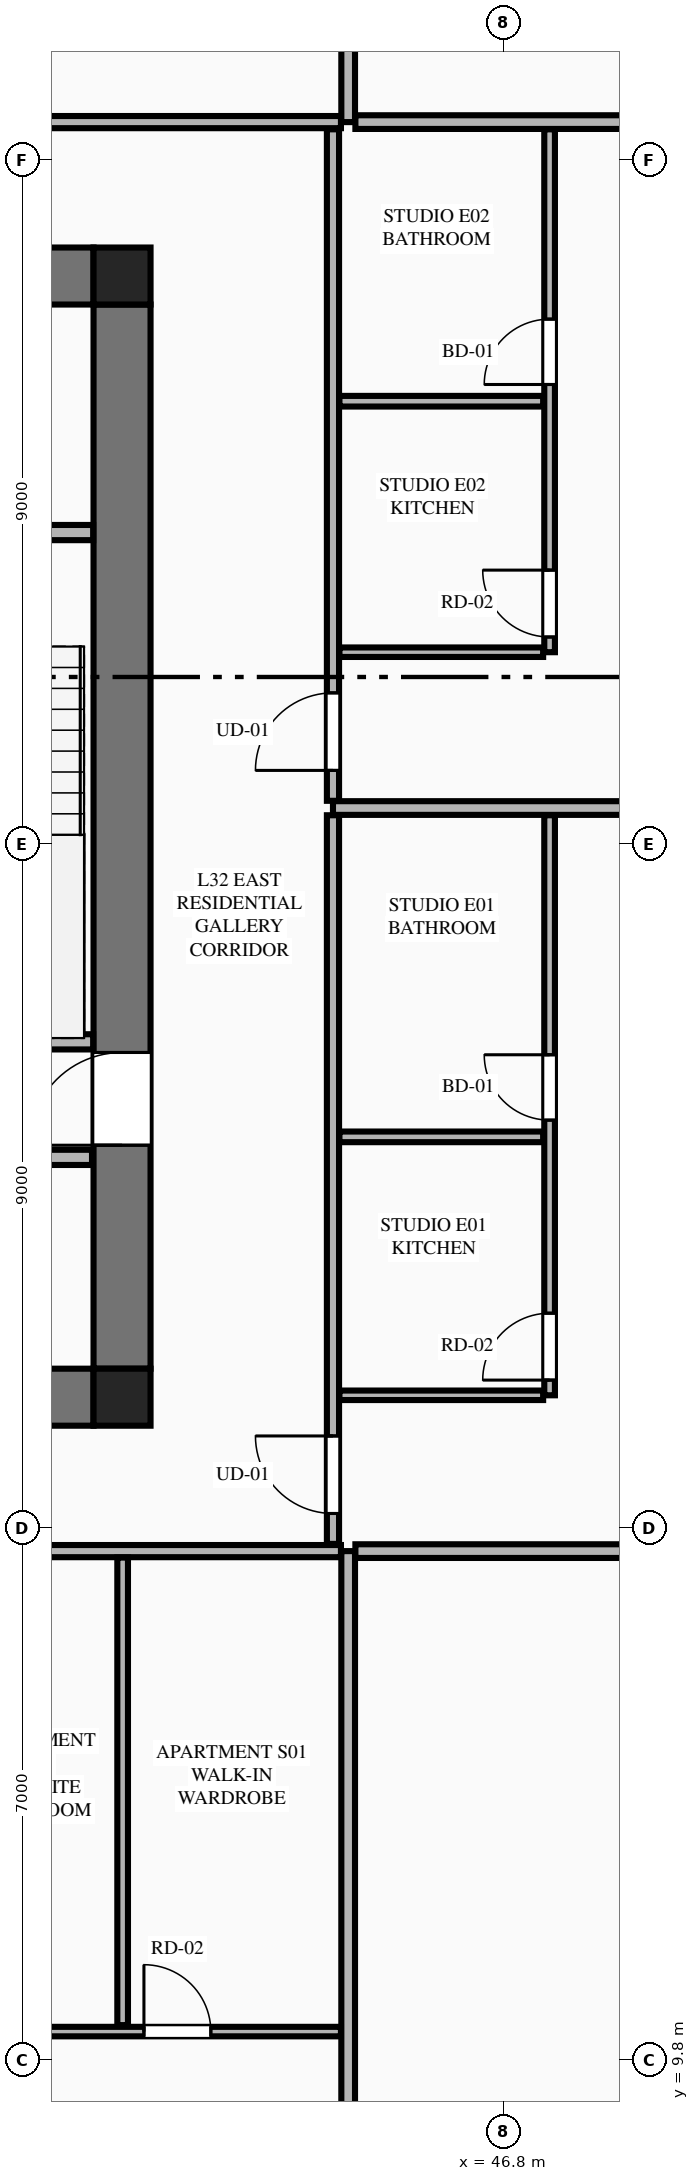
"""IFC4 building model, lengths in metres.
Left out: names, types, materials, properties, quantities, classifications, styles, units other than length and angle.
Written with IfcOpenShell. Run it as: python <this file> out.ifc"""

import sys

from ifc_helpers import new_model, si_unit, direction, frame, frame_2d, origin, origin_2d, place, context, subcontext, project, spatial, rectangle, extrude, element, fill, save


model = new_model("IFC4")
c1 = context("Model", 3, precision=1e-05, world=origin(), true_north=direction((0.0, 1.0)))
c2 = subcontext(c1, "Body", "Model", "MODEL_VIEW")
j1 = project(units=[si_unit("LENGTHUNIT", "METRE"), si_unit("PLANEANGLEUNIT", "RADIAN")], contexts=[c1])
p1 = place(None, origin())
s1 = spatial("IfcSite", under=j1, at=p1, CompositionType="ELEMENT")
p2 = place(p1, origin())
s2 = spatial("IfcBuilding", under=s1, at=p2, CompositionType="ELEMENT")
p3 = place(p2, frame((0.0, 0.0, 123.25)))
s3 = spatial("IfcBuildingStorey", under=s2, at=p3, CompositionType="ELEMENT", Elevation=123.25)
for number, where, z_axis, x_axis in (
    (1, (41.775, 18.525, 0.0), (0.0, 0.0, 1.0), (1.0, 0.0, 0.0)),
    (2, (41.775, 33.275, 0.0), (0.0, 0.0, 1.0), (1.0, 0.0, 0.0)),
):
    element("IfcColumn", number, at=place(p3, frame(where, z_axis=z_axis, x_axis=x_axis)), inside=s3, PredefinedType="COLUMN", context=c2, shape_type="SweptSolid", body=[
        extrude(rectangle(XDim=0.75, YDim=0.75, at=origin_2d()), origin(), (0.0, 0.0, 1.0), 3.55),
    ])
for number, where, z_axis, x_axis in (
    (3, (23.4, 18.525, 0.0), (0.0, 0.0, 1.0), (1.0, 0.0, 0.0)),
    (4, (23.4, 33.275, 0.0), (0.0, 0.0, 1.0), (1.0, 0.0, 0.0)),
):
    element("IfcWall", number, at=place(p3, frame(where, z_axis=z_axis, x_axis=x_axis)), inside=s3, PredefinedType="SHEAR", context=c2, shape_type="SweptSolid", body=[
        extrude(rectangle(XDim=18.0, YDim=0.75, at=frame_2d((9.0, 0.0))), origin(), (0.0, 0.0, 1.0), 3.34),
    ])
p4 = place(p3, frame((41.775, 18.9, 0.0), z_axis=(0.0, 0.0, 1.0), x_axis=(0.0, 1.0, 0.0)))
e5 = element("IfcWall", 5, at=p4, inside=s3, PredefinedType="SHEAR", context=c2, shape_type="SweptSolid", body=[
    extrude(rectangle(XDim=14.0, YDim=0.75, at=frame_2d((7.0, 0.0))), origin(), (0.0, 0.0, 1.0), 3.34),
])
p5 = place(p4, frame((2.94, 0.0, 0.0)))
e6 = element("IfcOpeningElement", 6, at=p5, cuts=e5, PredefinedType="OPENING", context=c2, shape_type="SweptSolid", body=[
    extrude(rectangle(XDim=1.22, YDim=2.25, at=frame_2d((0.61, 1.125))), frame((0.0, 0.385, 0.0), z_axis=(0.0, -1.0, 0.0), x_axis=(1.0, 0.0, 0.0)), (0.0, 0.0, 1.0), 0.77),
])
p6 = place(p3, frame((38.125, 23.2, 0.0), z_axis=(0.0, 0.0, 1.0), x_axis=(1.0, 0.0, 0.0)))
e7 = element("IfcWall", 7, at=p6, inside=s3, PredefinedType="PLUMBINGWALL", context=c2, shape_type="SweptSolid", body=[
    extrude(rectangle(XDim=3.27, YDim=0.2, at=frame_2d((1.635, 0.0))), origin(), (0.0, 0.0, 1.0), 3.34),
])
p7 = place(p3, frame((38.125, 29.9, 0.0), z_axis=(0.0, 0.0, 1.0), x_axis=(1.0, 0.0, 0.0)))
e8 = element("IfcWall", 8, at=p7, inside=s3, PredefinedType="PLUMBINGWALL", context=c2, shape_type="SweptSolid", body=[
    extrude(rectangle(XDim=3.27, YDim=0.2, at=frame_2d((1.635, 0.0))), origin(), (0.0, 0.0, 1.0), 3.34),
])
p8 = place(p7, frame((0.5, 0.0, 0.0)))
e9 = element("IfcOpeningElement", 9, at=p8, cuts=e8, PredefinedType="OPENING", context=c2, shape_type="SweptSolid", body=[
    extrude(rectangle(XDim=0.85, YDim=2.05, at=frame_2d((0.425, 1.025))), frame((0.0, 0.11, 0.0), z_axis=(0.0, -1.0, 0.0), x_axis=(1.0, 0.0, 0.0)), (0.0, 0.0, 1.0), 0.22),
])
p9 = place(p3, frame((23.42, 21.68, 0.0), z_axis=(0.0, 0.0, 1.0), x_axis=(1.0, 0.0, 0.0)))
e10 = element("IfcWall", 10, at=p9, inside=s3, PredefinedType="PLUMBINGWALL", context=c2, shape_type="SweptSolid", body=[
    extrude(rectangle(XDim=17.96, YDim=0.2, at=frame_2d((8.98, 0.0))), origin(), (0.0, 0.0, 1.0), 3.34),
])
p10 = place(p9, frame((11.6, 0.0, 0.0)))
e11 = element("IfcOpeningElement", 11, at=p10, cuts=e10, PredefinedType="OPENING", context=c2, shape_type="SweptSolid", body=[
    extrude(rectangle(XDim=1.1, YDim=2.2, at=frame_2d((0.55, 1.1))), frame((0.0, 0.11, 0.0), z_axis=(0.0, -1.0, 0.0), x_axis=(1.0, 0.0, 0.0)), (0.0, 0.0, 1.0), 0.22),
])
p11 = place(p9, frame((0.41, 0.0, 0.0)))
e12 = element("IfcOpeningElement", 12, at=p11, cuts=e10, PredefinedType="OPENING", context=c2, shape_type="SweptSolid", body=[
    extrude(rectangle(XDim=0.85, YDim=2.05, at=frame_2d((0.425, 1.025))), frame((0.0, 0.11, 0.0), z_axis=(0.0, -1.0, 0.0), x_axis=(1.0, 0.0, 0.0)), (0.0, 0.0, 1.0), 0.22),
])
p12 = place(p9, frame((13.78, 0.0, 0.0)))
e13 = element("IfcOpeningElement", 13, at=p12, cuts=e10, PredefinedType="OPENING", context=c2, shape_type="SweptSolid", body=[
    extrude(rectangle(XDim=0.85, YDim=2.05, at=frame_2d((0.425, 1.025))), frame((0.0, 0.11, 0.0), z_axis=(0.0, -1.0, 0.0), x_axis=(1.0, 0.0, 0.0)), (0.0, 0.0, 1.0), 0.22),
])
p13 = place(p9, frame((16.13, 0.0, 0.0)))
e14 = element("IfcOpeningElement", 14, at=p13, cuts=e10, PredefinedType="OPENING", context=c2, shape_type="SweptSolid", body=[
    extrude(rectangle(XDim=0.85, YDim=2.05, at=frame_2d((0.425, 1.025))), frame((0.0, 0.11, 0.0), z_axis=(0.0, -1.0, 0.0), x_axis=(1.0, 0.0, 0.0)), (0.0, 0.0, 1.0), 0.22),
])
p14 = place(p3, frame((47.975, 6.852, 0.0), z_axis=(0.0, 0.0, 1.0), x_axis=(0.451548465867, 0.892246593142, 0.0)))
e15 = element("IfcWall", 15, at=p14, inside=s3, PredefinedType="STANDARD", context=c2, shape_type="SweptSolid", body=[
    extrude(rectangle(XDim=5.04, YDim=0.34, at=frame_2d((2.52, 0.0))), origin(), (0.0, 0.0, 1.0), 2.797),
])
p15 = place(p14, frame((1.97, 0.0, 0.75)))
e16 = element("IfcOpeningElement", 16, at=p15, cuts=e15, PredefinedType="OPENING", context=c2, shape_type="SweptSolid", body=[
    extrude(rectangle(XDim=1.1, YDim=1.897, at=frame_2d((0.55, 0.948))), frame((0.0, 0.18, 0.0), z_axis=(0.0, -1.0, 0.0), x_axis=(1.0, 0.0, 0.0)), (0.0, 0.0, 1.0), 0.36),
])
p16 = place(p3, frame((44.75, 4.105, 0.0), z_axis=(0.0, 0.0, 1.0), x_axis=(0.0, 1.0, 0.0)))
e17 = element("IfcWall", 17, at=p16, inside=s3, PredefinedType="PARTITIONING", context=c2, shape_type="SweptSolid", body=[
    extrude(rectangle(XDim=12.395, YDim=0.18, at=frame_2d((6.198, 0.0))), origin(), (0.0, 0.0, 1.0), 3.34),
])
p17 = place(p3, frame((20.145, 16.5, 0.0), z_axis=(0.0, 0.0, 1.0), x_axis=(1.0, 0.0, 0.0)))
e18 = element("IfcWall", 18, at=p17, inside=s3, PredefinedType="PARTITIONING", context=c2, shape_type="SweptSolid", body=[
    extrude(rectangle(XDim=24.51, YDim=0.16, at=frame_2d((12.255, 0.0))), origin(), (0.0, 0.0, 1.0), 3.34),
])
p18 = place(p17, frame((0.405, 0.0, 0.0)))
e19 = element("IfcOpeningElement", 19, at=p18, cuts=e18, PredefinedType="OPENING", context=c2, shape_type="SweptSolid", body=[
    extrude(rectangle(XDim=1.35, YDim=2.35, at=frame_2d((0.675, 1.175))), frame((0.0, 0.09, 0.0), z_axis=(0.0, -1.0, 0.0), x_axis=(1.0, 0.0, 0.0)), (0.0, 0.0, 1.0), 0.18),
])
p19 = place(p3, frame((34.643, 10.179, 0.0), z_axis=(0.0, 0.0, 1.0), x_axis=(1.0, 0.0, 0.0)))
e20 = element("IfcWall", 20, at=p19, inside=s3, PredefinedType="PARTITIONING", context=c2, shape_type="SweptSolid", body=[
    extrude(rectangle(XDim=10.012, YDim=0.125, at=frame_2d((5.006, 0.0))), origin(), (0.0, 0.0, 1.0), 3.34),
])
p20 = place(p19, frame((5.18, 0.0, 0.0)))
e21 = element("IfcOpeningElement", 21, at=p20, cuts=e20, PredefinedType="OPENING", context=c2, shape_type="SweptSolid", body=[
    extrude(rectangle(XDim=0.86, YDim=2.1, at=frame_2d((0.43, 1.05))), frame((0.0, 0.073, 0.0), z_axis=(0.0, -1.0, 0.0), x_axis=(1.0, 0.0, 0.0)), (0.0, 0.0, 1.0), 0.145),
])
p21 = place(p19, frame((7.42, 0.0, 0.0)))
e22 = element("IfcOpeningElement", 22, at=p21, cuts=e20, PredefinedType="OPENING", context=c2, shape_type="SweptSolid", body=[
    extrude(rectangle(XDim=0.88, YDim=2.15, at=frame_2d((0.44, 1.075))), frame((0.0, 0.073, 0.0), z_axis=(0.0, -1.0, 0.0), x_axis=(1.0, 0.0, 0.0)), (0.0, 0.0, 1.0), 0.145),
])
p22 = place(p19, frame((0.3, 0.0, 0.0)))
e23 = element("IfcOpeningElement", 23, at=p22, cuts=e20, PredefinedType="OPENING", context=c2, shape_type="SweptSolid", body=[
    extrude(rectangle(XDim=0.88, YDim=2.15, at=frame_2d((0.44, 1.075))), frame((0.0, 0.073, 0.0), z_axis=(0.0, -1.0, 0.0), x_axis=(1.0, 0.0, 0.0)), (0.0, 0.0, 1.0), 0.145),
])
p23 = place(p3, frame((41.783, 10.264, 0.0), z_axis=(0.0, 0.0, 1.0), x_axis=(0.0, 1.0, 0.0)))
e24 = element("IfcWall", 24, at=p23, inside=s3, PredefinedType="PLUMBINGWALL", context=c2, shape_type="SweptSolid", body=[
    extrude(rectangle(XDim=6.151, YDim=0.14, at=frame_2d((3.076, 0.0))), origin(), (0.0, 0.0, 1.0), 2.722),
])
p24 = place(p3, frame((44.75, 35.3, 0.0), z_axis=(0.0, 0.0, 1.0), x_axis=(0.0, 1.0, 0.0)))
e25 = element("IfcWall", 25, at=p24, inside=s3, PredefinedType="PARTITIONING", context=c2, shape_type="SweptSolid", body=[
    extrude(rectangle(XDim=12.195, YDim=0.18, at=frame_2d((6.098, 0.0))), origin(), (0.0, 0.0, 1.0), 3.34),
])
p25 = place(p3, frame((20.145, 35.3, 0.0), z_axis=(0.0, 0.0, 1.0), x_axis=(1.0, 0.0, 0.0)))
e26 = element("IfcWall", 26, at=p25, inside=s3, PredefinedType="PARTITIONING", context=c2, shape_type="SweptSolid", body=[
    extrude(rectangle(XDim=24.51, YDim=0.16, at=frame_2d((12.255, 0.0))), origin(), (0.0, 0.0, 1.0), 3.34),
])
p26 = place(p25, frame((0.405, 0.0, 0.0)))
e27 = element("IfcOpeningElement", 27, at=p26, cuts=e26, PredefinedType="OPENING", context=c2, shape_type="SweptSolid", body=[
    extrude(rectangle(XDim=1.02, YDim=2.25, at=frame_2d((0.51, 1.125))), frame((0.0, 0.09, 0.0), z_axis=(0.0, -1.0, 0.0), x_axis=(1.0, 0.0, 0.0)), (0.0, 0.0, 1.0), 0.18),
])
p27 = place(p3, frame((44.845, 16.5, 0.0), z_axis=(0.0, 0.0, 1.0), x_axis=(1.0, 0.0, 0.0)))
e28 = element("IfcWall", 28, at=p27, inside=s3, PredefinedType="PARTITIONING", context=c2, shape_type="SweptSolid", body=[
    extrude(rectangle(XDim=7.77, YDim=0.18, at=frame_2d((3.885, 0.0))), origin(), (0.0, 0.0, 1.0), 3.34),
])
p28 = place(p3, frame((44.845, 35.3, 0.0), z_axis=(0.0, 0.0, 1.0), x_axis=(1.0, 0.0, 0.0)))
e29 = element("IfcWall", 29, at=p28, inside=s3, PredefinedType="PARTITIONING", context=c2, shape_type="SweptSolid", body=[
    extrude(rectangle(XDim=7.669, YDim=0.18, at=frame_2d((3.834, 0.0))), origin(), (0.0, 0.0, 1.0), 3.34),
])
p29 = place(p3, frame((44.55, 16.595, 0.0), z_axis=(0.0, 0.0, 1.0), x_axis=(0.0, 1.0, 0.0)))
e30 = element("IfcWall", 30, at=p29, inside=s3, PredefinedType="PARTITIONING", context=c2, shape_type="SweptSolid", body=[
    extrude(rectangle(XDim=9.586, YDim=0.16, at=frame_2d((4.793, 0.0))), origin(), (0.0, 0.0, 1.0), 3.34),
])
p30 = place(p29, frame((0.4, 0.0, 0.0)))
e31 = element("IfcOpeningElement", 31, at=p30, cuts=e30, PredefinedType="OPENING", context=c2, shape_type="SweptSolid", body=[
    extrude(rectangle(XDim=1.02, YDim=2.25, at=frame_2d((0.51, 1.125))), frame((0.0, 0.09, 0.0), z_axis=(0.0, -1.0, 0.0), x_axis=(1.0, 0.0, 0.0)), (0.0, 0.0, 1.0), 0.18),
])
p31 = place(p3, frame((44.635, 18.55, 0.0), z_axis=(0.0, 0.0, 1.0), x_axis=(1.0, 0.0, 0.0)))
e32 = element("IfcWall", 32, at=p31, inside=s3, PredefinedType="PARTITIONING", context=c2, shape_type="SweptSolid", body=[
    extrude(rectangle(XDim=2.68, YDim=0.125, at=frame_2d((1.34, 0.0))), origin(), (0.0, 0.0, 1.0), 2.722),
])
p32 = place(p3, frame((47.4, 18.55, 0.0), z_axis=(0.0, 0.0, 1.0), x_axis=(0.0, 1.0, 0.0)))
e33 = element("IfcWall", 33, at=p32, inside=s3, PredefinedType="PLUMBINGWALL", context=c2, shape_type="SweptSolid", body=[
    extrude(rectangle(XDim=7.631, YDim=0.14, at=frame_2d((3.815, 0.0))), origin(), (0.0, 0.0, 1.0), 3.34),
])
p33 = place(p32, frame((3.62, 0.0, 0.0)))
e34 = element("IfcOpeningElement", 34, at=p33, cuts=e33, PredefinedType="OPENING", context=c2, shape_type="SweptSolid", body=[
    extrude(rectangle(XDim=0.86, YDim=2.1, at=frame_2d((0.43, 1.05))), frame((0.0, 0.08, 0.0), z_axis=(0.0, -1.0, 0.0), x_axis=(1.0, 0.0, 0.0)), (0.0, 0.0, 1.0), 0.16),
])
p34 = place(p32, frame((0.2, 0.0, 0.0)))
e35 = element("IfcOpeningElement", 35, at=p34, cuts=e33, PredefinedType="OPENING", context=c2, shape_type="SweptSolid", body=[
    extrude(rectangle(XDim=0.88, YDim=2.15, at=frame_2d((0.44, 1.075))), frame((0.0, 0.08, 0.0), z_axis=(0.0, -1.0, 0.0), x_axis=(1.0, 0.0, 0.0)), (0.0, 0.0, 1.0), 0.16),
])
p35 = place(p3, frame((44.635, 21.95, 0.0), z_axis=(0.0, 0.0, 1.0), x_axis=(1.0, 0.0, 0.0)))
e36 = element("IfcWall", 36, at=p35, inside=s3, PredefinedType="PLUMBINGWALL", context=c2, shape_type="SweptSolid", body=[
    extrude(rectangle(XDim=2.68, YDim=0.14, at=frame_2d((1.34, 0.0))), origin(), (0.0, 0.0, 1.0), 3.34),
])
p36 = place(p3, frame((44.55, 26.276, 0.0), z_axis=(0.0, 0.0, 1.0), x_axis=(1.0, 0.0, 0.0)))
e37 = element("IfcWall", 37, at=p36, inside=s3, PredefinedType="PARTITIONING", context=c2, shape_type="SweptSolid", body=[
    extrude(rectangle(XDim=12.308, YDim=0.18, at=frame_2d((6.154, 0.0))), origin(), (0.0, 0.0, 1.0), 3.34),
])
p37 = place(p3, frame((44.55, 26.371, 0.0), z_axis=(0.0, 0.0, 1.0), x_axis=(0.0, 1.0, 0.0)))
e38 = element("IfcWall", 38, at=p37, inside=s3, PredefinedType="PARTITIONING", context=c2, shape_type="SweptSolid", body=[
    extrude(rectangle(XDim=8.834, YDim=0.16, at=frame_2d((4.417, 0.0))), origin(), (0.0, 0.0, 1.0), 3.34),
])
p38 = place(p37, frame((0.4, 0.0, 0.0)))
e39 = element("IfcOpeningElement", 39, at=p38, cuts=e38, PredefinedType="OPENING", context=c2, shape_type="SweptSolid", body=[
    extrude(rectangle(XDim=1.02, YDim=2.25, at=frame_2d((0.51, 1.125))), frame((0.0, 0.09, 0.0), z_axis=(0.0, -1.0, 0.0), x_axis=(1.0, 0.0, 0.0)), (0.0, 0.0, 1.0), 0.18),
])
p39 = place(p3, frame((44.635, 28.326, 0.0), z_axis=(0.0, 0.0, 1.0), x_axis=(1.0, 0.0, 0.0)))
e40 = element("IfcWall", 40, at=p39, inside=s3, PredefinedType="PARTITIONING", context=c2, shape_type="SweptSolid", body=[
    extrude(rectangle(XDim=2.68, YDim=0.125, at=frame_2d((1.34, 0.0))), origin(), (0.0, 0.0, 1.0), 3.34),
])
p40 = place(p3, frame((47.4, 28.326, 0.0), z_axis=(0.0, 0.0, 1.0), x_axis=(0.0, 1.0, 0.0)))
e41 = element("IfcWall", 41, at=p40, inside=s3, PredefinedType="PLUMBINGWALL", context=c2, shape_type="SweptSolid", body=[
    extrude(rectangle(XDim=6.879, YDim=0.14, at=frame_2d((3.439, 0.0))), origin(), (0.0, 0.0, 1.0), 3.34),
])
p41 = place(p40, frame((3.522, 0.0, 0.0)))
e42 = element("IfcOpeningElement", 42, at=p41, cuts=e41, PredefinedType="OPENING", context=c2, shape_type="SweptSolid", body=[
    extrude(rectangle(XDim=0.86, YDim=2.1, at=frame_2d((0.43, 1.05))), frame((0.0, 0.08, 0.0), z_axis=(0.0, -1.0, 0.0), x_axis=(1.0, 0.0, 0.0)), (0.0, 0.0, 1.0), 0.16),
])
p42 = place(p40, frame((0.2, 0.0, 0.0)))
e43 = element("IfcOpeningElement", 43, at=p42, cuts=e41, PredefinedType="OPENING", context=c2, shape_type="SweptSolid", body=[
    extrude(rectangle(XDim=0.88, YDim=2.15, at=frame_2d((0.44, 1.075))), frame((0.0, 0.08, 0.0), z_axis=(0.0, -1.0, 0.0), x_axis=(1.0, 0.0, 0.0)), (0.0, 0.0, 1.0), 0.16),
])
p43 = place(p3, frame((44.635, 31.628, 0.0), z_axis=(0.0, 0.0, 1.0), x_axis=(1.0, 0.0, 0.0)))
e44 = element("IfcWall", 44, at=p43, inside=s3, PredefinedType="PLUMBINGWALL", context=c2, shape_type="SweptSolid", body=[
    extrude(rectangle(XDim=2.68, YDim=0.14, at=frame_2d((1.34, 0.0))), origin(), (0.0, 0.0, 1.0), 3.34),
])
p44 = place(p5, origin())
e45 = element("IfcDoor", 45, at=p44, inside=s3, OperationType="SINGLE_SWING_LEFT", PredefinedType="DOOR", context=c2, shape_type="SweptSolid", body=[
    extrude(rectangle(XDim=1.22, YDim=2.25, at=frame_2d((0.61, 1.125))), frame((0.0, 0.025, 0.0), z_axis=(0.0, -1.0, 0.0), x_axis=(1.0, 0.0, 0.0)), (0.0, 0.0, 1.0), 0.05),
])
fill(e6, e45)
p45 = place(p21, origin())
e46 = element("IfcDoor", 46, at=p45, inside=s3, OperationType="SINGLE_SWING_LEFT", PredefinedType="DOOR", context=c2, shape_type="SweptSolid", body=[
    extrude(rectangle(XDim=0.88, YDim=2.15, at=frame_2d((0.44, 1.075))), frame((0.0, 0.025, 0.0), z_axis=(0.0, -1.0, 0.0), x_axis=(1.0, 0.0, 0.0)), (0.0, 0.0, 1.0), 0.05),
])
fill(e22, e46)
p46 = place(p33, origin())
e47 = element("IfcDoor", 47, at=p46, inside=s3, OperationType="SINGLE_SWING_RIGHT", PredefinedType="DOOR", context=c2, shape_type="SweptSolid", body=[
    extrude(rectangle(XDim=0.86, YDim=2.1, at=frame_2d((0.43, 1.05))), frame((0.0, 0.025, 0.0), z_axis=(0.0, -1.0, 0.0), x_axis=(1.0, 0.0, 0.0)), (0.0, 0.0, 1.0), 0.05),
])
fill(e34, e47)
p47 = place(p30, origin())
e48 = element("IfcDoor", 48, at=p47, inside=s3, OperationType="SINGLE_SWING_RIGHT", PredefinedType="DOOR", context=c2, shape_type="SweptSolid", body=[
    extrude(rectangle(XDim=1.02, YDim=2.25, at=frame_2d((0.51, 1.125))), frame((0.0, 0.025, 0.0), z_axis=(0.0, -1.0, 0.0), x_axis=(1.0, 0.0, 0.0)), (0.0, 0.0, 1.0), 0.05),
])
fill(e31, e48)
p48 = place(p34, origin())
e49 = element("IfcDoor", 49, at=p48, inside=s3, OperationType="SINGLE_SWING_LEFT", PredefinedType="DOOR", context=c2, shape_type="SweptSolid", body=[
    extrude(rectangle(XDim=0.88, YDim=2.15, at=frame_2d((0.44, 1.075))), frame((0.0, 0.025, 0.0), z_axis=(0.0, -1.0, 0.0), x_axis=(1.0, 0.0, 0.0)), (0.0, 0.0, 1.0), 0.05),
])
fill(e35, e49)
p49 = place(p41, origin())
e50 = element("IfcDoor", 50, at=p49, inside=s3, OperationType="SINGLE_SWING_LEFT", PredefinedType="DOOR", context=c2, shape_type="SweptSolid", body=[
    extrude(rectangle(XDim=0.86, YDim=2.1, at=frame_2d((0.43, 1.05))), frame((0.0, 0.025, 0.0), z_axis=(0.0, -1.0, 0.0), x_axis=(1.0, 0.0, 0.0)), (0.0, 0.0, 1.0), 0.05),
])
fill(e42, e50)
p50 = place(p38, origin())
e51 = element("IfcDoor", 51, at=p50, inside=s3, OperationType="SINGLE_SWING_LEFT", PredefinedType="DOOR", context=c2, shape_type="SweptSolid", body=[
    extrude(rectangle(XDim=1.02, YDim=2.25, at=frame_2d((0.51, 1.125))), frame((0.0, 0.025, 0.0), z_axis=(0.0, -1.0, 0.0), x_axis=(1.0, 0.0, 0.0)), (0.0, 0.0, 1.0), 0.05),
])
fill(e39, e51)
p51 = place(p42, origin())
e52 = element("IfcDoor", 52, at=p51, inside=s3, OperationType="SINGLE_SWING_RIGHT", PredefinedType="DOOR", context=c2, shape_type="SweptSolid", body=[
    extrude(rectangle(XDim=0.88, YDim=2.15, at=frame_2d((0.44, 1.075))), frame((0.0, 0.025, 0.0), z_axis=(0.0, -1.0, 0.0), x_axis=(1.0, 0.0, 0.0)), (0.0, 0.0, 1.0), 0.05),
])
fill(e43, e52)
save(model, sys.argv[1])
